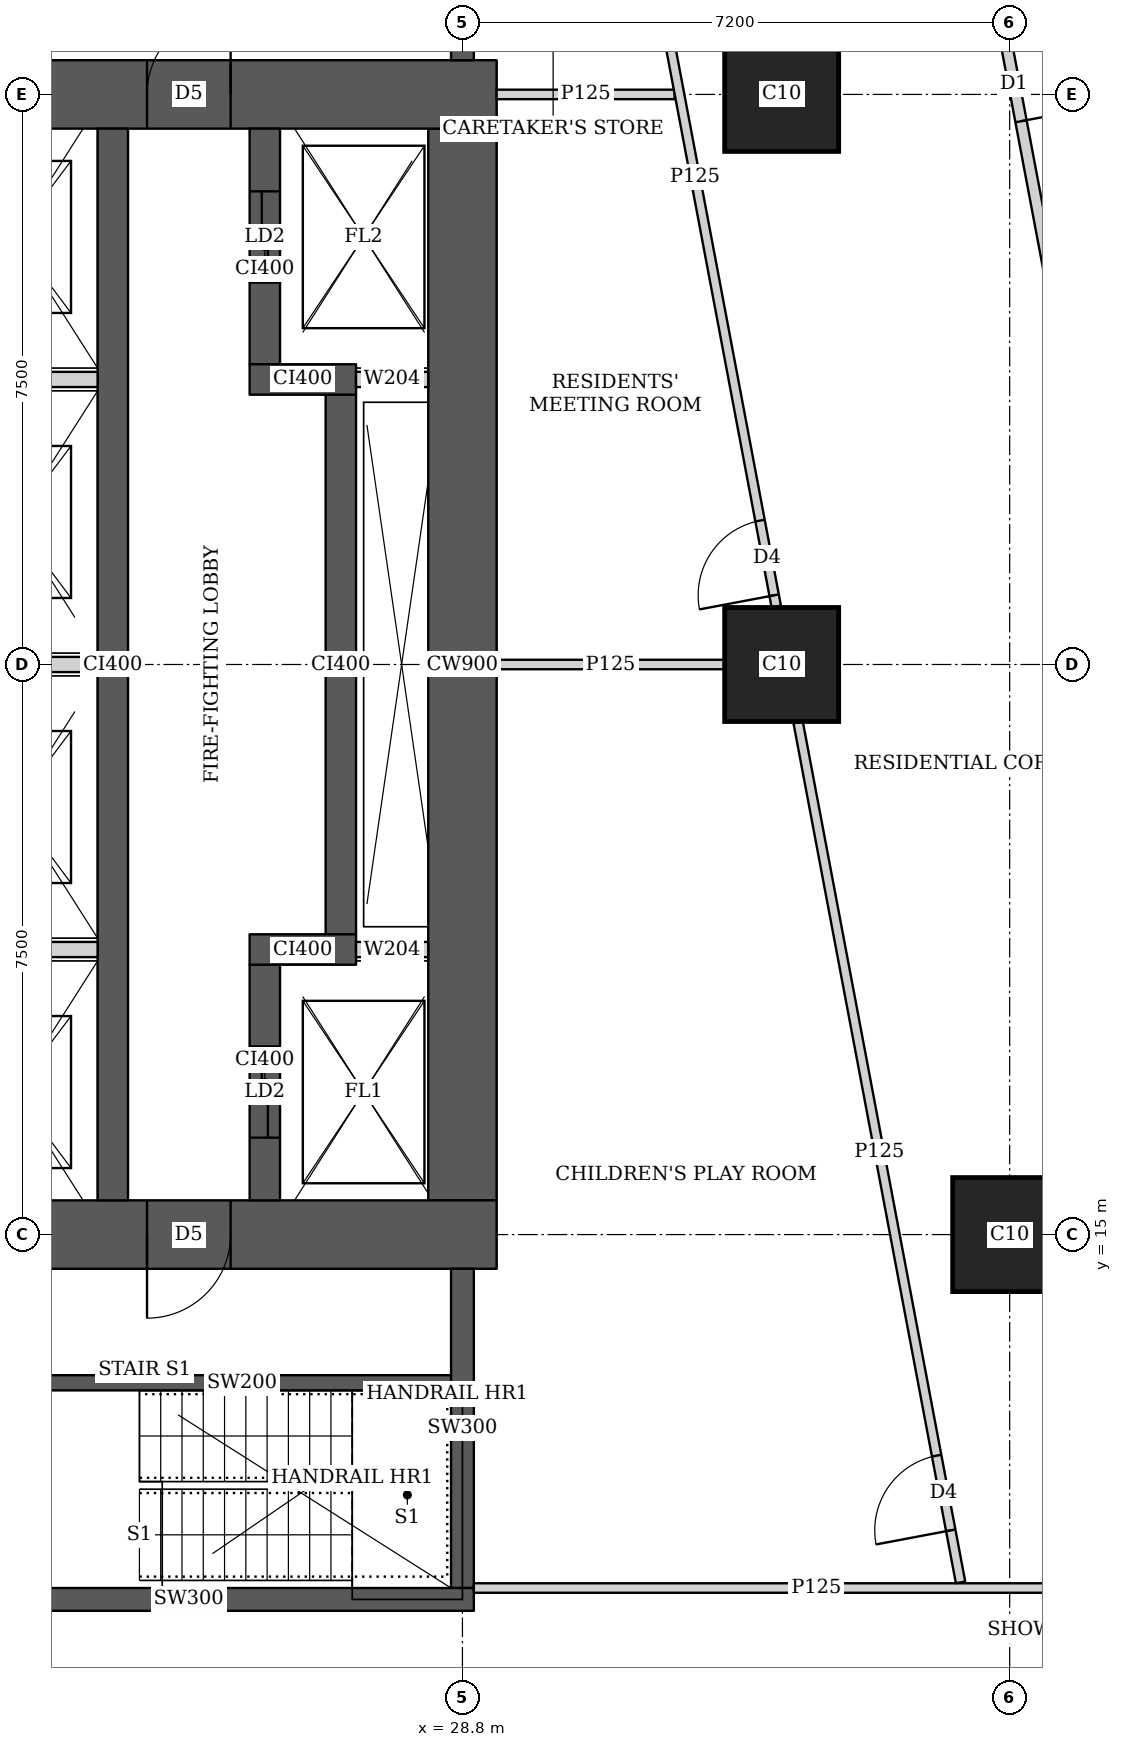
"""IFC4 building model, lengths in metres.
Left out: names, types, materials, properties, quantities, classifications, styles, units other than length and angle.
Written with IfcOpenShell. Run it as: python <this file> out.ifc"""

import sys

from ifc_helpers import new_model, si_unit, direction, frame, frame_2d, origin, origin_2d, place, context, subcontext, project, spatial, rectangle, extrude, element, fill, save


model = new_model("IFC4")
c1 = context("Model", 3, precision=1e-05, world=origin(), true_north=direction((0.0, 1.0)))
c2 = subcontext(c1, "Body", "Model", "MODEL_VIEW")
j1 = project(units=[si_unit("LENGTHUNIT", "METRE"), si_unit("PLANEANGLEUNIT", "RADIAN")], contexts=[c1])
p1 = place(None, origin())
s1 = spatial("IfcSite", under=j1, at=p1, CompositionType="ELEMENT")
p2 = place(p1, origin())
s2 = spatial("IfcBuilding", under=s1, at=p2, CompositionType="ELEMENT")
p3 = place(p2, frame((0.0, 0.0, 184.55)))
s3 = spatial("IfcBuildingStorey", under=s2, at=p3, CompositionType="ELEMENT", Elevation=184.55)
for number, where, z_axis, x_axis in (
    (1, (36.0, 15.0, 0.0), (0.0, 0.0, 1.0), (1.0, 0.0, 0.0)),
    (2, (33.0, 22.5, 0.0), (0.0, 0.0, 1.0), (1.0, 0.0, 0.0)),
    (3, (33.0, 30.0, 0.0), (0.0, 0.0, 1.0), (1.0, 0.0, 0.0)),
):
    element("IfcColumn", number, at=place(p3, frame(where, z_axis=z_axis, x_axis=x_axis)), inside=s3, PredefinedType="COLUMN", context=c2, shape_type="SweptSolid", body=[
        extrude(rectangle(XDim=1.5, YDim=1.5, at=origin_2d()), origin(), (0.0, 0.0, 1.0), 3.75),
    ])
p4 = place(p3, frame((13.95, 15.0, 0.0), z_axis=(0.0, 0.0, 1.0), x_axis=(1.0, 0.0, 0.0)))
e4 = element("IfcWall", 4, at=p4, inside=s3, PredefinedType="SHEAR", context=c2, shape_type="SweptSolid", body=[
    extrude(rectangle(XDim=15.3, YDim=0.9, at=frame_2d((7.65, 0.0))), origin(), (0.0, 0.0, 1.0), 3.75),
])
p5 = place(p4, frame((4.45, 0.0, 0.0)))
e5 = element("IfcOpeningElement", 5, at=p5, cuts=e4, PredefinedType="OPENING", context=c2, shape_type="SweptSolid", body=[
    extrude(rectangle(XDim=1.8, YDim=2.1, at=frame_2d((0.9, 1.05))), frame((0.0, 0.46, 0.0), z_axis=(0.0, -1.0, 0.0), x_axis=(1.0, 0.0, 0.0)), (0.0, 0.0, 1.0), 0.92),
])
p6 = place(p4, frame((10.7, 0.0, 0.0)))
e6 = element("IfcOpeningElement", 6, at=p6, cuts=e4, PredefinedType="OPENING", context=c2, shape_type="SweptSolid", body=[
    extrude(rectangle(XDim=1.1, YDim=2.1, at=frame_2d((0.55, 1.05))), frame((0.0, 0.46, 0.0), z_axis=(0.0, -1.0, 0.0), x_axis=(1.0, 0.0, 0.0)), (0.0, 0.0, 1.0), 0.92),
])
p7 = place(p3, frame((13.95, 30.0, 0.0), z_axis=(0.0, 0.0, 1.0), x_axis=(1.0, 0.0, 0.0)))
e7 = element("IfcWall", 7, at=p7, inside=s3, PredefinedType="SHEAR", context=c2, shape_type="SweptSolid", body=[
    extrude(rectangle(XDim=15.3, YDim=0.9, at=frame_2d((7.65, 0.0))), origin(), (0.0, 0.0, 1.0), 3.75),
])
p8 = place(p7, frame((4.45, 0.0, 0.0)))
e8 = element("IfcOpeningElement", 8, at=p8, cuts=e7, PredefinedType="OPENING", context=c2, shape_type="SweptSolid", body=[
    extrude(rectangle(XDim=1.8, YDim=2.1, at=frame_2d((0.9, 1.05))), frame((0.0, 0.46, 0.0), z_axis=(0.0, -1.0, 0.0), x_axis=(1.0, 0.0, 0.0)), (0.0, 0.0, 1.0), 0.92),
])
p9 = place(p7, frame((10.7, 0.0, 0.0)))
e9 = element("IfcOpeningElement", 9, at=p9, cuts=e7, PredefinedType="OPENING", context=c2, shape_type="SweptSolid", body=[
    extrude(rectangle(XDim=1.1, YDim=2.1, at=frame_2d((0.55, 1.05))), frame((0.0, 0.46, 0.0), z_axis=(0.0, -1.0, 0.0), x_axis=(1.0, 0.0, 0.0)), (0.0, 0.0, 1.0), 0.92),
])
p10 = place(p3, frame((28.8, 15.45, 0.0), z_axis=(0.0, 0.0, 1.0), x_axis=(0.0, 1.0, 0.0)))
e10 = element("IfcWall", 10, at=p10, inside=s3, PredefinedType="SHEAR", context=c2, shape_type="SweptSolid", body=[
    extrude(rectangle(XDim=14.1, YDim=0.9, at=frame_2d((7.05, 0.0))), origin(), (0.0, 0.0, 1.0), 3.75),
])
p11 = place(p3, frame((24.2, 15.45, 0.0), z_axis=(0.0, 0.0, 1.0), x_axis=(0.0, 1.0, 0.0)))
e11 = element("IfcWall", 11, at=p11, inside=s3, PredefinedType="SHEAR", context=c2, shape_type="SweptSolid", body=[
    extrude(rectangle(XDim=14.1, YDim=0.4, at=frame_2d((7.05, 0.0))), origin(), (0.0, 0.0, 1.0), 3.75),
])
p12 = place(p3, frame((26.2, 15.45, 0.0), z_axis=(0.0, 0.0, 1.0), x_axis=(0.0, 1.0, 0.0)))
e12 = element("IfcWall", 12, at=p12, inside=s3, PredefinedType="SHEAR", context=c2, shape_type="SweptSolid", body=[
    extrude(rectangle(XDim=3.1, YDim=0.4, at=frame_2d((1.55, 0.0))), origin(), (0.0, 0.0, 1.0), 3.75),
])
p13 = place(p12, frame((0.825, 0.0, 0.0)))
e13 = element("IfcOpeningElement", 13, at=p13, cuts=e12, PredefinedType="OPENING", context=c2, shape_type="SweptSolid", body=[
    extrude(rectangle(XDim=1.2, YDim=2.1, at=frame_2d((0.6, 1.05))), frame((0.0, 0.21, 0.0), z_axis=(0.0, -1.0, 0.0), x_axis=(1.0, 0.0, 0.0)), (0.0, 0.0, 1.0), 0.42),
])
p14 = place(p3, frame((26.0, 18.75, 0.0), z_axis=(0.0, 0.0, 1.0), x_axis=(1.0, 0.0, 0.0)))
e14 = element("IfcWall", 14, at=p14, inside=s3, PredefinedType="SHEAR", context=c2, shape_type="SweptSolid", body=[
    extrude(rectangle(XDim=1.4, YDim=0.4, at=frame_2d((0.7, 0.0))), origin(), (0.0, 0.0, 1.0), 3.75),
])
p15 = place(p3, frame((27.2, 18.95, 0.0), z_axis=(0.0, 0.0, 1.0), x_axis=(0.0, 1.0, 0.0)))
e15 = element("IfcWall", 15, at=p15, inside=s3, PredefinedType="SHEAR", context=c2, shape_type="SweptSolid", body=[
    extrude(rectangle(XDim=7.1, YDim=0.4, at=frame_2d((3.55, 0.0))), origin(), (0.0, 0.0, 1.0), 3.75),
])
p16 = place(p3, frame((26.0, 26.25, 0.0), z_axis=(0.0, 0.0, 1.0), x_axis=(1.0, 0.0, 0.0)))
e16 = element("IfcWall", 16, at=p16, inside=s3, PredefinedType="SHEAR", context=c2, shape_type="SweptSolid", body=[
    extrude(rectangle(XDim=1.4, YDim=0.4, at=frame_2d((0.7, 0.0))), origin(), (0.0, 0.0, 1.0), 3.75),
])
p17 = place(p3, frame((26.2, 26.45, 0.0), z_axis=(0.0, 0.0, 1.0), x_axis=(0.0, 1.0, 0.0)))
e17 = element("IfcWall", 17, at=p17, inside=s3, PredefinedType="SHEAR", context=c2, shape_type="SweptSolid", body=[
    extrude(rectangle(XDim=3.1, YDim=0.4, at=frame_2d((1.55, 0.0))), origin(), (0.0, 0.0, 1.0), 3.75),
])
p18 = place(p17, frame((1.075, 0.0, 0.0)))
e18 = element("IfcOpeningElement", 18, at=p18, cuts=e17, PredefinedType="OPENING", context=c2, shape_type="SweptSolid", body=[
    extrude(rectangle(XDim=1.2, YDim=2.1, at=frame_2d((0.6, 1.05))), frame((0.0, 0.21, 0.0), z_axis=(0.0, -1.0, 0.0), x_axis=(1.0, 0.0, 0.0)), (0.0, 0.0, 1.0), 0.42),
])
p19 = place(p3, frame((21.45, 10.2, 0.0), z_axis=(0.0, 0.0, 1.0), x_axis=(1.0, 0.0, 0.0)))
e19 = element("IfcWall", 19, at=p19, inside=s3, PredefinedType="SHEAR", context=c2, shape_type="SweptSolid", body=[
    extrude(rectangle(XDim=7.5, YDim=0.3, at=frame_2d((3.75, 0.0))), origin(), (0.0, 0.0, 1.0), 3.75),
])
p20 = place(p19, frame((0.5, 0.0, 0.0)))
e20 = element("IfcOpeningElement", 20, at=p20, cuts=e19, PredefinedType="OPENING", context=c2, shape_type="SweptSolid", body=[
    extrude(rectangle(XDim=1.1, YDim=2.1, at=frame_2d((0.55, 1.05))), frame((0.0, 0.16, 0.0), z_axis=(0.0, -1.0, 0.0), x_axis=(1.0, 0.0, 0.0)), (0.0, 0.0, 1.0), 0.32),
])
for number, where, z_axis, x_axis in (
    (21, (28.8, 10.35, 0.0), (0.0, 0.0, 1.0), (0.0, 1.0, 0.0)),
    (22, (28.8, 30.45, 0.0), (0.0, 0.0, 1.0), (0.0, 1.0, 0.0)),
):
    element("IfcWall", number, at=place(p3, frame(where, z_axis=z_axis, x_axis=x_axis)), inside=s3, PredefinedType="SHEAR", context=c2, shape_type="SweptSolid", body=[
        extrude(rectangle(XDim=4.2, YDim=0.3, at=frame_2d((2.1, 0.0))), origin(), (0.0, 0.0, 1.0), 3.75),
    ])
p21 = place(p3, frame((33.623, 43.022, 0.0), z_axis=(0.0, 0.0, 1.0), x_axis=(0.185596841028, -0.98262597798, 0.0)))
e23 = element("IfcWall", 23, at=p21, inside=s3, PredefinedType="SOLIDWALL", context=c2, shape_type="SweptSolid", body=[
    extrude(rectangle(XDim=41.66, YDim=0.15, at=frame_2d((20.83, 0.0))), origin(), (0.0, 0.0, 1.0), 2.45),
])
p22 = place(p21, frame((8.034, 0.0, 0.0)))
e24 = element("IfcOpeningElement", 24, at=p22, cuts=e23, PredefinedType="OPENING", context=c2, shape_type="SweptSolid", body=[
    extrude(rectangle(XDim=1.0, YDim=2.1, at=frame_2d((0.5, 1.05))), frame((0.0, 0.085, 0.0), z_axis=(0.0, -1.0, 0.0), x_axis=(1.0, 0.0, 0.0)), (0.0, 0.0, 1.0), 0.17),
])
p23 = place(p21, frame((12.611, 0.0, 0.0)))
e25 = element("IfcOpeningElement", 25, at=p23, cuts=e23, PredefinedType="OPENING", context=c2, shape_type="SweptSolid", body=[
    extrude(rectangle(XDim=1.0, YDim=2.1, at=frame_2d((0.5, 1.05))), frame((0.0, 0.085, 0.0), z_axis=(0.0, -1.0, 0.0), x_axis=(1.0, 0.0, 0.0)), (0.0, 0.0, 1.0), 0.17),
])
p24 = place(p21, frame((20.242, 0.0, 0.0)))
e26 = element("IfcOpeningElement", 26, at=p24, cuts=e23, PredefinedType="OPENING", context=c2, shape_type="SweptSolid", body=[
    extrude(rectangle(XDim=1.0, YDim=2.1, at=frame_2d((0.5, 1.05))), frame((0.0, 0.085, 0.0), z_axis=(0.0, -1.0, 0.0), x_axis=(1.0, 0.0, 0.0)), (0.0, 0.0, 1.0), 0.17),
])
p25 = place(p21, frame((31.206, 0.0, 0.0)))
e27 = element("IfcOpeningElement", 27, at=p25, cuts=e23, PredefinedType="OPENING", context=c2, shape_type="SweptSolid", body=[
    extrude(rectangle(XDim=1.0, YDim=2.1, at=frame_2d((0.5, 1.05))), frame((0.0, 0.085, 0.0), z_axis=(0.0, -1.0, 0.0), x_axis=(1.0, 0.0, 0.0)), (0.0, 0.0, 1.0), 0.17),
])
p26 = place(p3, frame((28.95, 10.35, 0.0), z_axis=(0.0, 0.0, 1.0), x_axis=(1.0, 0.0, 0.0)))
e28 = element("IfcWall", 28, at=p26, inside=s3, PredefinedType="PARTITIONING", context=c2, shape_type="SweptSolid", body=[
    extrude(rectangle(XDim=9.013, YDim=0.125, at=frame_2d((4.506, 0.0))), origin(), (0.0, 0.0, 1.0), 3.45),
])
p27 = place(p3, frame((35.354, 10.424, 0.0), z_axis=(0.0, 0.0, 1.0), x_axis=(-0.185612234763, 0.982623070311, 0.0)))
e29 = element("IfcWall", 29, at=p27, inside=s3, PredefinedType="PARTITIONING", context=c2, shape_type="SweptSolid", body=[
    extrude(rectangle(XDim=11.513, YDim=0.125, at=frame_2d((5.756, 0.0))), origin(), (0.0, 0.0, 1.0), 3.45),
])
p28 = place(p27, frame((0.697, 0.0, 0.0)))
e30 = element("IfcOpeningElement", 30, at=p28, cuts=e29, PredefinedType="OPENING", context=c2, shape_type="SweptSolid", body=[
    extrude(rectangle(XDim=1.0, YDim=2.1, at=frame_2d((0.5, 1.05))), frame((0.0, 0.073, 0.0), z_axis=(0.0, -1.0, 0.0), x_axis=(1.0, 0.0, 0.0)), (0.0, 0.0, 1.0), 0.145),
])
p29 = place(p3, frame((32.929, 23.263, 0.0), z_axis=(0.0, 0.0, 1.0), x_axis=(-0.185612234763, 0.982623070311, 0.0)))
e31 = element("IfcWall", 31, at=p29, inside=s3, PredefinedType="PARTITIONING", context=c2, shape_type="SweptSolid", body=[
    extrude(rectangle(XDim=11.513, YDim=0.125, at=frame_2d((5.756, 0.0))), origin(), (0.0, 0.0, 1.0), 3.45),
])
p30 = place(p29, frame((0.15, 0.0, 0.0)))
e32 = element("IfcOpeningElement", 32, at=p30, cuts=e31, PredefinedType="OPENING", context=c2, shape_type="SweptSolid", body=[
    extrude(rectangle(XDim=1.0, YDim=2.1, at=frame_2d((0.5, 1.05))), frame((0.0, 0.073, 0.0), z_axis=(0.0, -1.0, 0.0), x_axis=(1.0, 0.0, 0.0)), (0.0, 0.0, 1.0), 0.145),
])
p31 = place(p29, frame((7.679, 0.0, 0.0)))
e33 = element("IfcOpeningElement", 33, at=p31, cuts=e31, PredefinedType="OPENING", context=c2, shape_type="SweptSolid", body=[
    extrude(rectangle(XDim=1.0, YDim=2.1, at=frame_2d((0.5, 1.05))), frame((0.0, 0.073, 0.0), z_axis=(0.0, -1.0, 0.0), x_axis=(1.0, 0.0, 0.0)), (0.0, 0.0, 1.0), 0.145),
])
p32 = place(p29, frame((10.122, 0.0, 0.0)))
e34 = element("IfcOpeningElement", 34, at=p32, cuts=e31, PredefinedType="OPENING", context=c2, shape_type="SweptSolid", body=[
    extrude(rectangle(XDim=1.0, YDim=2.1, at=frame_2d((0.5, 1.05))), frame((0.0, 0.073, 0.0), z_axis=(0.0, -1.0, 0.0), x_axis=(1.0, 0.0, 0.0)), (0.0, 0.0, 1.0), 0.145),
])
p33 = place(p3, frame((29.25, 22.5, 0.0), z_axis=(0.0, 0.0, 1.0), x_axis=(1.0, 0.0, 0.0)))
e35 = element("IfcWall", 35, at=p33, inside=s3, PredefinedType="PARTITIONING", context=c2, shape_type="SweptSolid", body=[
    extrude(rectangle(XDim=2.999, YDim=0.125, at=frame_2d((1.5, 0.0))), origin(), (0.0, 0.0, 1.0), 3.45),
])
p34 = place(p3, frame((29.25, 30.0, 0.0), z_axis=(0.0, 0.0, 1.0), x_axis=(1.0, 0.0, 0.0)))
e36 = element("IfcWall", 36, at=p34, inside=s3, PredefinedType="PARTITIONING", context=c2, shape_type="SweptSolid", body=[
    extrude(rectangle(XDim=2.342, YDim=0.125, at=frame_2d((1.171, 0.0))), origin(), (0.0, 0.0, 1.0), 3.45),
])
p35 = place(p3, frame((23.0, 13.05, 0.0), z_axis=(0.0, 0.0, 1.0), x_axis=(1.0, 0.0, 0.0)))
e37 = element("IfcWall", 37, at=p35, inside=s3, PredefinedType="SHEAR", context=c2, shape_type="SweptSolid", body=[
    extrude(rectangle(XDim=5.8, YDim=0.2, at=frame_2d((2.9, 0.0))), origin(), (0.0, 0.0, 1.0), 3.75),
])
for number, where, z_axis, x_axis in (
    (38, (21.8, 18.75, 0.0), (0.0, 0.0, 1.0), (1.0, 0.0, 0.0)),
    (39, (21.8, 22.5, 0.0), (0.0, 0.0, 1.0), (1.0, 0.0, 0.0)),
    (40, (21.8, 26.25, 0.0), (0.0, 0.0, 1.0), (1.0, 0.0, 0.0)),
):
    element("IfcWall", number, at=place(p3, frame(where, z_axis=z_axis, x_axis=x_axis)), inside=s3, PredefinedType="SOLIDWALL", context=c2, shape_type="SweptSolid", body=[
        extrude(rectangle(XDim=2.2, YDim=0.2, at=frame_2d((1.1, 0.0))), origin(), (0.0, 0.0, 1.0), 3.45),
    ])
for number, where, z_axis, x_axis in (
    (41, (27.4, 18.75, 0.0), (0.0, 0.0, 1.0), (1.0, 0.0, 0.0)),
    (42, (27.4, 26.25, 0.0), (0.0, 0.0, 1.0), (1.0, 0.0, 0.0)),
):
    element("IfcWall", number, at=place(p3, frame(where, z_axis=z_axis, x_axis=x_axis)), inside=s3, PredefinedType="SOLIDWALL", context=c2, shape_type="SweptSolid", body=[
        extrude(rectangle(XDim=0.95, YDim=0.2, at=frame_2d((0.475, 0.0))), origin(), (0.0, 0.0, 1.0), 3.45),
    ])
p36 = place(p23, origin())
e43 = element("IfcDoor", 43, at=p36, inside=s3, OperationType="SINGLE_SWING_RIGHT", PredefinedType="DOOR", context=c2, shape_type="SweptSolid", body=[
    extrude(rectangle(XDim=1.0, YDim=2.1, at=frame_2d((0.5, 1.05))), frame((0.0, 0.025, 0.0), z_axis=(0.0, -1.0, 0.0), x_axis=(1.0, 0.0, 0.0)), (0.0, 0.0, 1.0), 0.05),
])
fill(e25, e43)
p37 = place(p28, origin())
e44 = element("IfcDoor", 44, at=p37, inside=s3, OperationType="SINGLE_SWING_LEFT", PredefinedType="DOOR", context=c2, shape_type="SweptSolid", body=[
    extrude(rectangle(XDim=1.0, YDim=2.1, at=frame_2d((0.5, 1.05))), frame((0.0, 0.025, 0.0), z_axis=(0.0, -1.0, 0.0), x_axis=(1.0, 0.0, 0.0)), (0.0, 0.0, 1.0), 0.05),
])
fill(e30, e44)
p38 = place(p30, origin())
e45 = element("IfcDoor", 45, at=p38, inside=s3, OperationType="SINGLE_SWING_LEFT", PredefinedType="DOOR", context=c2, shape_type="SweptSolid", body=[
    extrude(rectangle(XDim=1.0, YDim=2.1, at=frame_2d((0.5, 1.05))), frame((0.0, 0.025, 0.0), z_axis=(0.0, -1.0, 0.0), x_axis=(1.0, 0.0, 0.0)), (0.0, 0.0, 1.0), 0.05),
])
fill(e32, e45)
p39 = place(p6, origin())
e46 = element("IfcDoor", 46, at=p39, inside=s3, OperationType="SINGLE_SWING_RIGHT", PredefinedType="DOOR", context=c2, shape_type="SweptSolid", body=[
    extrude(rectangle(XDim=1.1, YDim=2.1, at=frame_2d((0.55, 1.05))), frame((0.0, 0.025, 0.0), z_axis=(0.0, -1.0, 0.0), x_axis=(1.0, 0.0, 0.0)), (0.0, 0.0, 1.0), 0.05),
])
fill(e6, e46)
p40 = place(p9, origin())
e47 = element("IfcDoor", 47, at=p40, inside=s3, OperationType="SINGLE_SWING_RIGHT", PredefinedType="DOOR", context=c2, shape_type="SweptSolid", body=[
    extrude(rectangle(XDim=1.1, YDim=2.1, at=frame_2d((0.55, 1.05))), frame((0.0, 0.025, 0.0), z_axis=(0.0, -1.0, 0.0), x_axis=(1.0, 0.0, 0.0)), (0.0, 0.0, 1.0), 0.05),
])
fill(e9, e47)
p41 = place(p13, origin())
e48 = element("IfcDoor", 48, at=p41, inside=s3, OperationType="DOUBLE_DOOR_SLIDING", PredefinedType="DOOR", context=c2, shape_type="SweptSolid", body=[
    extrude(rectangle(XDim=1.2, YDim=2.1, at=frame_2d((0.6, 1.05))), frame((0.0, 0.025, 0.0), z_axis=(0.0, -1.0, 0.0), x_axis=(1.0, 0.0, 0.0)), (0.0, 0.0, 1.0), 0.05),
])
fill(e13, e48)
p42 = place(p18, origin())
e49 = element("IfcDoor", 49, at=p42, inside=s3, OperationType="DOUBLE_DOOR_SLIDING", PredefinedType="DOOR", context=c2, shape_type="SweptSolid", body=[
    extrude(rectangle(XDim=1.2, YDim=2.1, at=frame_2d((0.6, 1.05))), frame((0.0, 0.025, 0.0), z_axis=(0.0, -1.0, 0.0), x_axis=(1.0, 0.0, 0.0)), (0.0, 0.0, 1.0), 0.05),
])
fill(e18, e49)
save(model, sys.argv[1])
